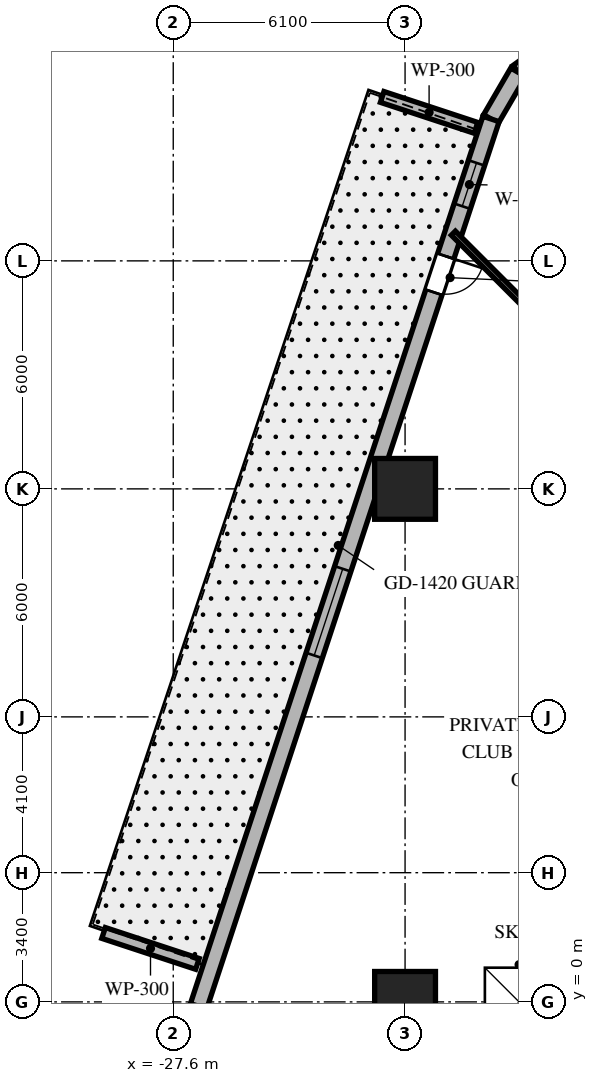
"""IFC4 building model, lengths in metres.
Left out: names, types, materials, properties, quantities, classifications, styles, units other than length and angle.
Written with IfcOpenShell. Run it as: python <this file> out.ifc"""

import sys

from ifc_helpers import new_model, si_unit, direction, frame, frame_2d, origin, origin_2d, place, context, subcontext, project, spatial, rectangle, extrude, element, fill, save


model = new_model("IFC4")
c1 = context("Model", 3, precision=1e-05, world=origin(), true_north=direction((0.0, 1.0)))
c2 = subcontext(c1, "Body", "Model", "MODEL_VIEW")
j1 = project(units=[si_unit("LENGTHUNIT", "METRE"), si_unit("PLANEANGLEUNIT", "RADIAN")], contexts=[c1])
p1 = place(None, origin())
s1 = spatial("IfcSite", under=j1, at=p1, CompositionType="ELEMENT")
p2 = place(p1, origin())
s2 = spatial("IfcBuilding", under=s1, at=p2, CompositionType="ELEMENT")
p3 = place(p2, frame((0.0, 0.0, 28.2)))
s3 = spatial("IfcBuildingStorey", under=s2, at=p3, CompositionType="ELEMENT", Elevation=28.2)
for number, where, z_axis, x_axis in (
    (1, (-21.5, 0.0, 0.0), (0.0, 0.0, 1.0), (1.0, 0.0, 0.0)),
    (2, (-21.5, 13.5, 0.0), (0.0, 0.0, 1.0), (1.0, 0.0, 0.0)),
):
    element("IfcColumn", number, at=place(p3, frame(where, z_axis=z_axis, x_axis=x_axis)), inside=s3, PredefinedType="COLUMN", context=c2, shape_type="SweptSolid", body=[
        extrude(rectangle(XDim=1.6, YDim=1.6, at=origin_2d()), origin(), (0.0, 0.0, 1.0), 6.0),
    ])
p4 = place(p3, frame((-17.392, 25.281, 0.0), z_axis=(0.0, 0.0, 1.0), x_axis=(-0.810222644551, -0.586122228086, 0.0)))
e3 = element("IfcWall", 3, at=p4, inside=s3, PredefinedType="SOLIDWALL", context=c2, shape_type="SweptSolid", body=[
    extrude(rectangle(XDim=1.397, YDim=0.45, at=frame_2d((0.698, 0.0))), origin(), (0.0, 0.0, 1.0), 5.7),
])
p5 = place(p3, frame((-18.524, 24.462, 0.0), z_axis=(0.0, 0.0, 1.0), x_axis=(-0.503080278093, -0.864239685385, 0.0)))
e4 = element("IfcWall", 4, at=p5, inside=s3, PredefinedType="SOLIDWALL", context=c2, shape_type="SweptSolid", body=[
    extrude(rectangle(XDim=1.421, YDim=0.45, at=frame_2d((0.71, 0.0))), origin(), (0.0, 0.0, 1.0), 5.7),
])
p6 = place(p3, frame((-19.239, 23.234, 0.0), z_axis=(0.0, 0.0, 1.0), x_axis=(-0.312996463282, -0.949754291369, 0.0)))
e5 = element("IfcWall", 5, at=p6, inside=s3, PredefinedType="SOLIDWALL", context=c2, shape_type="SweptSolid", body=[
    extrude(rectangle(XDim=24.584, YDim=0.45, at=frame_2d((12.292, 0.0))), origin(), (0.0, 0.0, 1.0), 5.7),
])
p7 = place(p6, frame((3.802, 0.0, 0.0)))
e6 = element("IfcOpeningElement", 6, at=p7, cuts=e5, PredefinedType="OPENING", context=c2, shape_type="SweptSolid", body=[
    extrude(rectangle(XDim=1.0, YDim=2.15, at=frame_2d((0.5, 1.075))), frame((0.0, 0.235, 0.0), z_axis=(0.0, -1.0, 0.0), x_axis=(1.0, 0.0, 0.0)), (0.0, 0.0, 1.0), 0.47),
])
p8 = place(p6, frame((1.217, 0.0, 0.85)))
e7 = element("IfcOpeningElement", 7, at=p8, cuts=e5, PredefinedType="OPENING", context=c2, shape_type="SweptSolid", body=[
    extrude(rectangle(XDim=1.2, YDim=1.8, at=frame_2d((0.6, 0.9))), frame((0.0, 0.235, 0.0), z_axis=(0.0, -1.0, 0.0), x_axis=(1.0, 0.0, 0.0)), (0.0, 0.0, 1.0), 0.47),
])
p9 = place(p6, frame((12.464, 0.0, 0.85)))
e8 = element("IfcOpeningElement", 8, at=p9, cuts=e5, PredefinedType="OPENING", context=c2, shape_type="SweptSolid", body=[
    extrude(rectangle(XDim=2.4, YDim=2.4, at=frame_2d((1.2, 1.2))), frame((0.0, 0.235, 0.0), z_axis=(0.0, -1.0, 0.0), x_axis=(1.0, 0.0, 0.0)), (0.0, 0.0, 1.0), 0.47),
])
for number, where, z_axis, x_axis in (
    (9, (-19.633, 23.0, 0.0), (0.0, 0.0, 1.0), (-0.95, 0.313, 0.0)),
    (10, (-26.964, 1.0, 0.0), (0.0, 0.0, 1.0), (-0.95, 0.313, 0.0)),
):
    element("IfcWall", number, at=place(p3, frame(where, z_axis=z_axis, x_axis=x_axis)), inside=s3, PredefinedType="PARAPET", context=c2, shape_type="SweptSolid", body=[
        extrude(rectangle(XDim=2.6, YDim=0.3, at=frame_2d((1.3, 0.0))), origin(), (0.0, 0.0, 1.0), 1.15),
    ])
p10 = place(p3, frame((-9.85, 9.85, 0.0), z_axis=(0.0, 0.0, 1.0), x_axis=(-0.707106781187, 0.707106781187, 0.0)))
e11 = element("IfcWall", 11, at=p10, inside=s3, PredefinedType="PARTITIONING", context=c2, shape_type="SweptSolid", body=[
    extrude(rectangle(XDim=14.678, YDim=0.15, at=frame_2d((7.339, 0.0))), origin(), (0.0, 0.0, 1.0), 2.89),
])
p11 = place(p3, frame((0.0, 0.0, -0.32)))
p12 = place(p11, frame((-18.5, 0.0, 0.27)))
e12 = element("IfcWindow", 12, at=p12, inside=s3, PartitioningType="SINGLE_PANEL", PredefinedType="SKYLIGHT", context=c2, shape_type="SweptSolid", body=[
    extrude(rectangle(XDim=1.8, YDim=1.8, at=origin_2d()), origin(), (0.0, 0.0, 1.0), 0.05),
])
p13 = place(p7, origin())
e13 = element("IfcDoor", 13, at=p13, inside=s3, OperationType="SINGLE_SWING_LEFT", PredefinedType="DOOR", context=c2, shape_type="SweptSolid", body=[
    extrude(rectangle(XDim=1.0, YDim=2.15, at=frame_2d((0.5, 1.075))), frame((0.0, 0.025, 0.0), z_axis=(0.0, -1.0, 0.0), x_axis=(1.0, 0.0, 0.0)), (0.0, 0.0, 1.0), 0.05),
])
fill(e6, e13)
p14 = place(p8, origin())
e14 = element("IfcWindow", 14, at=p14, inside=s3, PartitioningType="SINGLE_PANEL", PredefinedType="WINDOW", context=c2, shape_type="SweptSolid", body=[
    extrude(rectangle(XDim=1.2, YDim=1.8, at=frame_2d((0.6, 0.9))), frame((0.0, 0.03, 0.0), z_axis=(0.0, -1.0, 0.0), x_axis=(1.0, 0.0, 0.0)), (0.0, 0.0, 1.0), 0.06),
])
fill(e7, e14)
p15 = place(p9, origin())
e15 = element("IfcWindow", 15, at=p15, inside=s3, PartitioningType="SINGLE_PANEL", PredefinedType="WINDOW", context=c2, shape_type="SweptSolid", body=[
    extrude(rectangle(XDim=2.4, YDim=2.4, at=frame_2d((1.2, 1.2))), frame((0.0, 0.03, 0.0), z_axis=(0.0, -1.0, 0.0), x_axis=(1.0, 0.0, 0.0)), (0.0, 0.0, 1.0), 0.06),
])
fill(e8, e15)
save(model, sys.argv[1])
